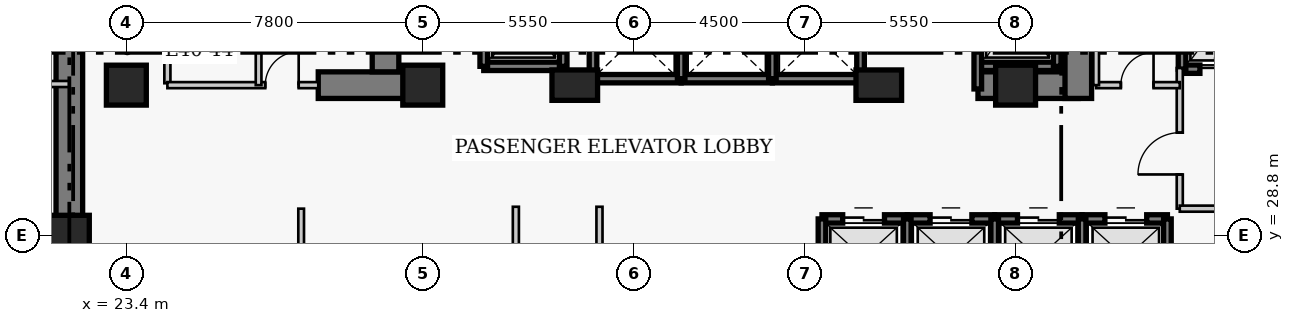
"""IFC4 building model, lengths in metres.
Left out: names, types, materials, properties, quantities, classifications, styles, units other than length and angle.
Written with IfcOpenShell. Run it as: python <this file> out.ifc"""

import sys

from ifc_helpers import new_model, si_unit, direction, frame, frame_2d, origin, origin_2d, place, context, subcontext, project, spatial, rectangle, extrude, element, fill, save


model = new_model("IFC4")
c1 = context("Model", 3, precision=1e-05, world=origin(), true_north=direction((0.0, 1.0)))
c2 = subcontext(c1, "Body", "Model", "MODEL_VIEW")
j1 = project(units=[si_unit("LENGTHUNIT", "METRE"), si_unit("PLANEANGLEUNIT", "RADIAN")], contexts=[c1])
p1 = place(None, origin())
s1 = spatial("IfcSite", under=j1, at=p1, CompositionType="ELEMENT")
p2 = place(p1, origin())
s2 = spatial("IfcBuilding", under=s1, at=p2, CompositionType="ELEMENT")
p3 = place(p2, frame((0.0, 0.0, 161.2)))
s3 = spatial("IfcBuildingStorey", under=s2, at=p3, CompositionType="ELEMENT", Elevation=161.2)
p4 = place(p3, frame((21.9, 27.05, 0.0), z_axis=(0.0, 0.0, 1.0), x_axis=(0.0, 1.0, 0.0)))
e1 = element("IfcWall", 1, at=p4, inside=s3, PredefinedType="SHEAR", context=c2, shape_type="SweptSolid", body=[
    extrude(rectangle(XDim=13.62, YDim=0.7, at=frame_2d((6.81, 0.0))), origin(), (0.0, 0.0, 1.0), 3.8),
])
p5 = place(p3, frame((28.45, 32.75, 0.0), z_axis=(0.0, 0.0, 1.0), x_axis=(1.0, 0.0, 0.0)))
e2 = element("IfcWall", 2, at=p5, inside=s3, PredefinedType="SHEAR", context=c2, shape_type="SweptSolid", body=[
    extrude(rectangle(XDim=2.4, YDim=0.7, at=frame_2d((1.2, 0.0))), origin(), (0.0, 0.0, 1.0), 3.8),
])
p6 = place(p3, frame((45.81, 32.75, 0.0), z_axis=(0.0, 0.0, 1.0), x_axis=(1.0, 0.0, 0.0)))
e3 = element("IfcWall", 3, at=p6, inside=s3, PredefinedType="SHEAR", context=c2, shape_type="SweptSolid", body=[
    extrude(rectangle(XDim=2.64, YDim=0.7, at=frame_2d((1.32, 0.0))), origin(), (0.0, 0.0, 1.0), 3.8),
])
p7 = place(p3, frame((30.22, 33.1, 0.0), z_axis=(0.0, 0.0, 1.0), x_axis=(0.0, 1.0, 0.0)))
e4 = element("IfcWall", 4, at=p7, inside=s3, PredefinedType="SHEAR", context=c2, shape_type="SweptSolid", body=[
    extrude(rectangle(XDim=7.22, YDim=0.7, at=frame_2d((3.61, 0.0))), origin(), (0.0, 0.0, 1.0), 3.8),
])
p8 = place(p3, frame((48.45, 32.4, 0.0), z_axis=(0.0, 0.0, 1.0), x_axis=(0.0, 1.0, 0.0)))
e5 = element("IfcWall", 5, at=p8, inside=s3, PredefinedType="SHEAR", context=c2, shape_type="SweptSolid", body=[
    extrude(rectangle(XDim=7.92, YDim=0.7, at=frame_2d((3.96, 0.0))), origin(), (0.0, 0.0, 1.0), 3.8),
])
p9 = place(p8, frame((5.8, 0.0, 0.0)))
e6 = element("IfcOpeningElement", 6, at=p9, cuts=e5, PredefinedType="OPENING", context=c2, shape_type="SweptSolid", body=[
    extrude(rectangle(XDim=1.1, YDim=2.15, at=frame_2d((0.55, 1.075))), frame((0.0, 0.36, 0.0), z_axis=(0.0, -1.0, 0.0), x_axis=(1.0, 0.0, 0.0)), (0.0, 0.0, 1.0), 0.72),
])
for number, where, z_axis, x_axis in (
    (7, (21.9, 28.8, 0.0), (0.0, 0.0, 1.0), (1.0, 0.0, 0.0)),
    (8, (23.4, 32.75, 0.0), (0.0, 0.0, 1.0), (1.0, 0.0, 0.0)),
    (9, (31.2, 32.75, 0.0), (0.0, 0.0, 1.0), (1.0, 0.0, 0.0)),
):
    element("IfcColumn", number, at=place(p3, frame(where, z_axis=z_axis, x_axis=x_axis)), inside=s3, PredefinedType="COLUMN", context=c2, shape_type="SweptSolid", body=[
        extrude(rectangle(XDim=1.05, YDim=1.05, at=origin_2d()), origin(), (0.0, 0.0, 1.0), 3.8),
    ])
for number, where, z_axis, x_axis in (
    (10, (35.2, 32.75, 0.0), (0.0, 0.0, 1.0), (1.0, 0.0, 0.0)),
    (11, (43.2, 32.75, 0.0), (0.0, 0.0, 1.0), (1.0, 0.0, 0.0)),
):
    element("IfcColumn", number, at=place(p3, frame(where, z_axis=z_axis, x_axis=x_axis)), inside=s3, PredefinedType="COLUMN", context=c2, shape_type="SweptSolid", body=[
        extrude(rectangle(XDim=1.2, YDim=0.8, at=origin_2d()), origin(), (0.0, 0.0, 1.0), 3.8),
    ])
p10 = place(p3, frame((46.8, 32.75, 0.0), z_axis=(0.0, 0.0, 1.0), x_axis=(1.0, 0.0, 0.0)))
e12 = element("IfcColumn", 12, at=p10, inside=s3, PredefinedType="COLUMN", context=c2, shape_type="SweptSolid", body=[
    extrude(rectangle(XDim=1.05, YDim=1.05, at=origin_2d()), origin(), (0.0, 0.0, 1.0), 3.8),
])
p11 = place(p3, frame((41.705, 29.23, 0.0), z_axis=(0.0, 0.0, 1.0), x_axis=(1.0, 0.0, 0.0)))
e13 = element("IfcWall", 13, at=p11, inside=s3, PredefinedType="SHEAR", context=c2, shape_type="SweptSolid", body=[
    extrude(rectangle(XDim=2.245, YDim=0.22, at=frame_2d((1.123, 0.0))), origin(), (0.0, 0.0, 1.0), 3.8),
])
p12 = place(p11, frame((0.545, 0.0, 0.0)))
e14 = element("IfcOpeningElement", 14, at=p12, cuts=e13, PredefinedType="OPENING", context=c2, shape_type="SweptSolid", body=[
    extrude(rectangle(XDim=1.1, YDim=2.15, at=frame_2d((0.55, 1.075))), frame((0.0, 0.12, 0.0), z_axis=(0.0, -1.0, 0.0), x_axis=(1.0, 0.0, 0.0)), (0.0, 0.0, 1.0), 0.24),
])
p13 = place(p3, frame((41.705, 27.17, 0.0), z_axis=(0.0, 0.0, 1.0), x_axis=(0.0, 1.0, 0.0)))
e15 = element("IfcWall", 15, at=p13, inside=s3, PredefinedType="SHEAR", context=c2, shape_type="SweptSolid", body=[
    extrude(rectangle(XDim=2.06, YDim=0.2, at=frame_2d((1.03, 0.0))), origin(), (0.0, 0.0, 1.0), 3.8),
])
p14 = place(p3, frame((43.95, 29.23, 0.0), z_axis=(0.0, 0.0, 1.0), x_axis=(1.0, 0.0, 0.0)))
e16 = element("IfcWall", 16, at=p14, inside=s3, PredefinedType="SHEAR", context=c2, shape_type="SweptSolid", body=[
    extrude(rectangle(XDim=2.3, YDim=0.22, at=frame_2d((1.15, 0.0))), origin(), (0.0, 0.0, 1.0), 3.8),
])
p15 = place(p14, frame((0.6, 0.0, 0.0)))
e17 = element("IfcOpeningElement", 17, at=p15, cuts=e16, PredefinedType="OPENING", context=c2, shape_type="SweptSolid", body=[
    extrude(rectangle(XDim=1.1, YDim=2.15, at=frame_2d((0.55, 1.075))), frame((0.0, 0.12, 0.0), z_axis=(0.0, -1.0, 0.0), x_axis=(1.0, 0.0, 0.0)), (0.0, 0.0, 1.0), 0.24),
])
p16 = place(p3, frame((43.95, 27.17, 0.0), z_axis=(0.0, 0.0, 1.0), x_axis=(0.0, 1.0, 0.0)))
e18 = element("IfcWall", 18, at=p16, inside=s3, PredefinedType="SHEAR", context=c2, shape_type="SweptSolid", body=[
    extrude(rectangle(XDim=2.06, YDim=0.2, at=frame_2d((1.03, 0.0))), origin(), (0.0, 0.0, 1.0), 3.8),
])
p17 = place(p3, frame((46.25, 29.23, 0.0), z_axis=(0.0, 0.0, 1.0), x_axis=(1.0, 0.0, 0.0)))
e19 = element("IfcWall", 19, at=p17, inside=s3, PredefinedType="SHEAR", context=c2, shape_type="SweptSolid", body=[
    extrude(rectangle(XDim=2.3, YDim=0.22, at=frame_2d((1.15, 0.0))), origin(), (0.0, 0.0, 1.0), 3.8),
])
p18 = place(p17, frame((0.6, 0.0, 0.0)))
e20 = element("IfcOpeningElement", 20, at=p18, cuts=e19, PredefinedType="OPENING", context=c2, shape_type="SweptSolid", body=[
    extrude(rectangle(XDim=1.1, YDim=2.15, at=frame_2d((0.55, 1.075))), frame((0.0, 0.12, 0.0), z_axis=(0.0, -1.0, 0.0), x_axis=(1.0, 0.0, 0.0)), (0.0, 0.0, 1.0), 0.24),
])
p19 = place(p3, frame((46.25, 27.17, 0.0), z_axis=(0.0, 0.0, 1.0), x_axis=(0.0, 1.0, 0.0)))
e21 = element("IfcWall", 21, at=p19, inside=s3, PredefinedType="SHEAR", context=c2, shape_type="SweptSolid", body=[
    extrude(rectangle(XDim=2.06, YDim=0.2, at=frame_2d((1.03, 0.0))), origin(), (0.0, 0.0, 1.0), 3.8),
])
p20 = place(p3, frame((48.55, 29.23, 0.0), z_axis=(0.0, 0.0, 1.0), x_axis=(1.0, 0.0, 0.0)))
e22 = element("IfcWall", 22, at=p20, inside=s3, PredefinedType="SHEAR", context=c2, shape_type="SweptSolid", body=[
    extrude(rectangle(XDim=2.245, YDim=0.22, at=frame_2d((1.123, 0.0))), origin(), (0.0, 0.0, 1.0), 3.8),
])
p21 = place(p20, frame((0.6, 0.0, 0.0)))
e23 = element("IfcOpeningElement", 23, at=p21, cuts=e22, PredefinedType="OPENING", context=c2, shape_type="SweptSolid", body=[
    extrude(rectangle(XDim=1.1, YDim=2.15, at=frame_2d((0.55, 1.075))), frame((0.0, 0.12, 0.0), z_axis=(0.0, -1.0, 0.0), x_axis=(1.0, 0.0, 0.0)), (0.0, 0.0, 1.0), 0.24),
])
for number, where, z_axis, x_axis in (
    (24, (48.55, 27.17, 0.0), (0.0, 0.0, 1.0), (0.0, 1.0, 0.0)),
    (25, (50.795, 27.17, 0.0), (0.0, 0.0, 1.0), (0.0, 1.0, 0.0)),
):
    element("IfcWall", number, at=place(p3, frame(where, z_axis=z_axis, x_axis=x_axis)), inside=s3, PredefinedType="SHEAR", context=c2, shape_type="SweptSolid", body=[
        extrude(rectangle(XDim=2.06, YDim=0.2, at=frame_2d((1.03, 0.0))), origin(), (0.0, 0.0, 1.0), 3.8),
    ])
p22 = place(p3, frame((35.68, 32.92, 0.0), z_axis=(0.0, 0.0, 1.0), x_axis=(1.0, 0.0, 0.0)))
e26 = element("IfcWall", 26, at=p22, inside=s3, PredefinedType="SHEAR", context=c2, shape_type="SweptSolid", body=[
    extrude(rectangle(XDim=2.32, YDim=0.22, at=frame_2d((1.16, 0.0))), origin(), (0.0, 0.0, 1.0), 3.8),
])
p23 = place(p3, frame((35.68, 32.92, 0.0), z_axis=(0.0, 0.0, 1.0), x_axis=(0.0, 1.0, 0.0)))
e27 = element("IfcWall", 27, at=p23, inside=s3, PredefinedType="SHEAR", context=c2, shape_type="SweptSolid", body=[
    extrude(rectangle(XDim=2.16, YDim=0.2, at=frame_2d((1.08, 0.0))), origin(), (0.0, 0.0, 1.0), 3.8),
])
p24 = place(p3, frame((38.0, 32.92, 0.0), z_axis=(0.0, 0.0, 1.0), x_axis=(1.0, 0.0, 0.0)))
e28 = element("IfcWall", 28, at=p24, inside=s3, PredefinedType="SHEAR", context=c2, shape_type="SweptSolid", body=[
    extrude(rectangle(XDim=2.4, YDim=0.22, at=frame_2d((1.2, 0.0))), origin(), (0.0, 0.0, 1.0), 3.8),
])
p25 = place(p3, frame((38.0, 32.92, 0.0), z_axis=(0.0, 0.0, 1.0), x_axis=(0.0, 1.0, 0.0)))
e29 = element("IfcWall", 29, at=p25, inside=s3, PredefinedType="SHEAR", context=c2, shape_type="SweptSolid", body=[
    extrude(rectangle(XDim=2.16, YDim=0.2, at=frame_2d((1.08, 0.0))), origin(), (0.0, 0.0, 1.0), 3.8),
])
p26 = place(p3, frame((40.4, 32.92, 0.0), z_axis=(0.0, 0.0, 1.0), x_axis=(1.0, 0.0, 0.0)))
e30 = element("IfcWall", 30, at=p26, inside=s3, PredefinedType="SHEAR", context=c2, shape_type="SweptSolid", body=[
    extrude(rectangle(XDim=2.32, YDim=0.22, at=frame_2d((1.16, 0.0))), origin(), (0.0, 0.0, 1.0), 3.8),
])
for number, where, z_axis, x_axis in (
    (31, (40.4, 32.92, 0.0), (0.0, 0.0, 1.0), (0.0, 1.0, 0.0)),
    (32, (42.72, 32.92, 0.0), (0.0, 0.0, 1.0), (0.0, 1.0, 0.0)),
):
    element("IfcWall", number, at=place(p3, frame(where, z_axis=z_axis, x_axis=x_axis)), inside=s3, PredefinedType="SHEAR", context=c2, shape_type="SweptSolid", body=[
        extrude(rectangle(XDim=2.16, YDim=0.2, at=frame_2d((1.08, 0.0))), origin(), (0.0, 0.0, 1.0), 3.8),
    ])
p27 = place(p3, frame((51.18, 33.17, 0.0), z_axis=(0.0, 0.0, 1.0), x_axis=(1.0, 0.0, 0.0)))
e33 = element("IfcWall", 33, at=p27, inside=s3, PredefinedType="SHEAR", context=c2, shape_type="SweptSolid", body=[
    extrude(rectangle(XDim=2.42, YDim=0.22, at=frame_2d((1.21, 0.0))), origin(), (0.0, 0.0, 1.0), 3.8),
])
p28 = place(p27, frame((0.47, 0.0, 0.0)))
e34 = element("IfcOpeningElement", 34, at=p28, cuts=e33, PredefinedType="OPENING", context=c2, shape_type="SweptSolid", body=[
    extrude(rectangle(XDim=1.3, YDim=2.15, at=frame_2d((0.65, 1.075))), frame((0.0, 0.12, 0.0), z_axis=(0.0, -1.0, 0.0), x_axis=(1.0, 0.0, 0.0)), (0.0, 0.0, 1.0), 0.24),
])
p29 = place(p3, frame((51.18, 33.17, 0.0), z_axis=(0.0, 0.0, 1.0), x_axis=(0.0, 1.0, 0.0)))
e35 = element("IfcWall", 35, at=p29, inside=s3, PredefinedType="SHEAR", context=c2, shape_type="SweptSolid", body=[
    extrude(rectangle(XDim=2.86, YDim=0.2, at=frame_2d((1.43, 0.0))), origin(), (0.0, 0.0, 1.0), 3.8),
])
p30 = place(p3, frame((32.805, 33.245, 0.0), z_axis=(0.0, 0.0, 1.0), x_axis=(1.0, 0.0, 0.0)))
e36 = element("IfcWall", 36, at=p30, inside=s3, PredefinedType="SHEAR", context=c2, shape_type="SweptSolid", body=[
    extrude(rectangle(XDim=2.09, YDim=0.22, at=frame_2d((1.045, 0.0))), origin(), (0.0, 0.0, 1.0), 3.8),
])
for number, where, z_axis, x_axis in (
    (37, (32.805, 33.245, 0.0), (0.0, 0.0, 1.0), (0.0, 1.0, 0.0)),
    (38, (34.895, 33.245, 0.0), (0.0, 0.0, 1.0), (0.0, 1.0, 0.0)),
):
    element("IfcWall", number, at=place(p3, frame(where, z_axis=z_axis, x_axis=x_axis)), inside=s3, PredefinedType="SHEAR", context=c2, shape_type="SweptSolid", body=[
        extrude(rectangle(XDim=2.91, YDim=0.2, at=frame_2d((1.455, 0.0))), origin(), (0.0, 0.0, 1.0), 3.8),
    ])
p31 = place(p3, frame((45.805, 33.245, 0.0), z_axis=(0.0, 0.0, 1.0), x_axis=(1.0, 0.0, 0.0)))
e39 = element("IfcWall", 39, at=p31, inside=s3, PredefinedType="SHEAR", context=c2, shape_type="SweptSolid", body=[
    extrude(rectangle(XDim=2.09, YDim=0.22, at=frame_2d((1.045, 0.0))), origin(), (0.0, 0.0, 1.0), 3.8),
])
p32 = place(p3, frame((45.805, 32.65, 0.0), z_axis=(0.0, 0.0, 1.0), x_axis=(0.0, 1.0, 0.0)))
e40 = element("IfcWall", 40, at=p32, inside=s3, PredefinedType="SHEAR", context=c2, shape_type="SweptSolid", body=[
    extrude(rectangle(XDim=3.505, YDim=0.2, at=frame_2d((1.752, 0.0))), origin(), (0.0, 0.0, 1.0), 3.8),
])
p33 = place(p3, frame((47.895, 33.245, 0.0), z_axis=(0.0, 0.0, 1.0), x_axis=(0.0, 1.0, 0.0)))
e41 = element("IfcWall", 41, at=p33, inside=s3, PredefinedType="SHEAR", context=c2, shape_type="SweptSolid", body=[
    extrude(rectangle(XDim=2.91, YDim=0.2, at=frame_2d((1.455, 0.0))), origin(), (0.0, 0.0, 1.0), 3.8),
])
p34 = place(p3, frame((24.48, 32.8, 0.0), z_axis=(0.0, 0.0, 1.0), x_axis=(0.0, 1.0, 0.0)))
e42 = element("IfcWall", 42, at=p34, inside=s3, PredefinedType="PARTITIONING", context=c2, shape_type="SweptSolid", body=[
    extrude(rectangle(XDim=3.57, YDim=0.16, at=frame_2d((1.785, 0.0))), origin(), (0.0, 0.0, 1.0), 3.55),
])
p35 = place(p34, frame((1.604, 0.0, 0.0)))
e43 = element("IfcOpeningElement", 43, at=p35, cuts=e42, PredefinedType="OPENING", context=c2, shape_type="SweptSolid", body=[
    extrude(rectangle(XDim=0.9, YDim=2.1, at=frame_2d((0.45, 1.05))), frame((0.0, 0.09, 0.0), z_axis=(0.0, -1.0, 0.0), x_axis=(1.0, 0.0, 0.0)), (0.0, 0.0, 1.0), 0.18),
])
p36 = place(p3, frame((51.12, 29.5, 0.0), z_axis=(0.0, 0.0, 1.0), x_axis=(0.0, 1.0, 0.0)))
e44 = element("IfcWall", 44, at=p36, inside=s3, PredefinedType="PARTITIONING", context=c2, shape_type="SweptSolid", body=[
    extrude(rectangle(XDim=3.7, YDim=0.16, at=frame_2d((1.85, 0.0))), origin(), (0.0, 0.0, 1.0), 3.55),
])
p37 = place(p36, frame((0.9, 0.0, 0.0)))
e45 = element("IfcOpeningElement", 45, at=p37, cuts=e44, PredefinedType="OPENING", context=c2, shape_type="SweptSolid", body=[
    extrude(rectangle(XDim=1.1, YDim=2.15, at=frame_2d((0.55, 1.075))), frame((0.0, 0.09, 0.0), z_axis=(0.0, -1.0, 0.0), x_axis=(1.0, 0.0, 0.0)), (0.0, 0.0, 1.0), 0.18),
])
p38 = place(p3, frame((51.12, 29.5, 0.0), z_axis=(0.0, 0.0, 1.0), x_axis=(1.0, 0.0, 0.0)))
e46 = element("IfcWall", 46, at=p38, inside=s3, PredefinedType="PARTITIONING", context=c2, shape_type="SweptSolid", body=[
    extrude(rectangle(XDim=5.63, YDim=0.16, at=frame_2d((2.815, 0.0))), origin(), (0.0, 0.0, 1.0), 3.55),
])
p39 = place(p3, frame((24.48, 32.75, 0.0), z_axis=(0.0, 0.0, 1.0), x_axis=(1.0, 0.0, 0.0)))
e47 = element("IfcWall", 47, at=p39, inside=s3, PredefinedType="PARTITIONING", context=c2, shape_type="SweptSolid", body=[
    extrude(rectangle(XDim=3.97, YDim=0.16, at=frame_2d((1.985, 0.0))), origin(), (0.0, 0.0, 1.0), 3.55),
])
p40 = place(p39, frame((2.575, 0.0, 0.0)))
e48 = element("IfcOpeningElement", 48, at=p40, cuts=e47, PredefinedType="OPENING", context=c2, shape_type="SweptSolid", body=[
    extrude(rectangle(XDim=0.88, YDim=2.05, at=frame_2d((0.44, 1.025))), frame((0.0, 0.09, 0.0), z_axis=(0.0, -1.0, 0.0), x_axis=(1.0, 0.0, 0.0)), (0.0, 0.0, 1.0), 0.18),
])
p41 = place(p3, frame((48.92, 32.75, 0.0), z_axis=(0.0, 0.0, 1.0), x_axis=(1.0, 0.0, 0.0)))
e49 = element("IfcWall", 49, at=p41, inside=s3, PredefinedType="PARTITIONING", context=c2, shape_type="SweptSolid", body=[
    extrude(rectangle(XDim=2.2, YDim=0.16, at=frame_2d((1.1, 0.0))), origin(), (0.0, 0.0, 1.0), 3.55),
])
p42 = place(p41, frame((0.65, 0.0, 0.0)))
e50 = element("IfcOpeningElement", 50, at=p42, cuts=e49, PredefinedType="OPENING", context=c2, shape_type="SweptSolid", body=[
    extrude(rectangle(XDim=0.86, YDim=2.05, at=frame_2d((0.43, 1.025))), frame((0.0, 0.09, 0.0), z_axis=(0.0, -1.0, 0.0), x_axis=(1.0, 0.0, 0.0)), (0.0, 0.0, 1.0), 0.18),
])
for number, where, z_axis, x_axis in (
    (51, (48.92, 32.75, 0.0), (0.0, 0.0, 1.0), (0.0, 1.0, 0.0)),
    (52, (26.88, 32.75, 0.0), (0.0, 0.0, 1.0), (0.0, 1.0, 0.0)),
):
    element("IfcWall", number, at=place(p3, frame(where, z_axis=z_axis, x_axis=x_axis)), inside=s3, PredefinedType="PARTITIONING", context=c2, shape_type="SweptSolid", body=[
        extrude(rectangle(XDim=3.62, YDim=0.15, at=frame_2d((1.81, 0.0))), origin(), (0.0, 0.0, 1.0), 3.55),
    ])
for number, where, z_axis, x_axis in (
    (53, (33.65, 16.51, 0.0), (0.0, 0.0, 1.0), (0.0, 1.0, 0.0)),
    (54, (35.85, 16.51, 0.0), (0.0, 0.0, 1.0), (0.0, 1.0, 0.0)),
):
    element("IfcWall", number, at=place(p3, frame(where, z_axis=z_axis, x_axis=x_axis)), inside=s3, PredefinedType="PARTITIONING", context=c2, shape_type="SweptSolid", body=[
        extrude(rectangle(XDim=13.04, YDim=0.16, at=frame_2d((6.52, 0.0))), origin(), (0.0, 0.0, 1.0), 3.55),
    ])
p43 = place(p3, frame((19.41, 32.78, 0.0), z_axis=(0.0, 0.0, 1.0), x_axis=(1.0, 0.0, 0.0)))
e55 = element("IfcWall", 55, at=p43, inside=s3, PredefinedType="PARTITIONING", context=c2, shape_type="SweptSolid", body=[
    extrude(rectangle(XDim=2.49, YDim=0.16, at=frame_2d((1.245, 0.0))), origin(), (0.0, 0.0, 1.0), 3.55),
])
p44 = place(p3, frame((28.0, 16.51, 0.0), z_axis=(0.0, 0.0, 1.0), x_axis=(0.0, 1.0, 0.0)))
e56 = element("IfcWall", 56, at=p44, inside=s3, PredefinedType="PARTITIONING", context=c2, shape_type="SweptSolid", body=[
    extrude(rectangle(XDim=12.99, YDim=0.15, at=frame_2d((6.495, 0.0))), origin(), (0.0, 0.0, 1.0), 3.55),
])
p45 = place(p12, origin())
e57 = element("IfcDoor", 57, at=p45, inside=s3, OperationType="DOUBLE_DOOR_SLIDING", PredefinedType="DOOR", context=c2, shape_type="SweptSolid", body=[
    extrude(rectangle(XDim=1.1, YDim=2.15, at=frame_2d((0.55, 1.075))), frame((0.0, 0.025, 0.0), z_axis=(0.0, -1.0, 0.0), x_axis=(1.0, 0.0, 0.0)), (0.0, 0.0, 1.0), 0.05),
])
fill(e14, e57)
p46 = place(p15, origin())
e58 = element("IfcDoor", 58, at=p46, inside=s3, OperationType="DOUBLE_DOOR_SLIDING", PredefinedType="DOOR", context=c2, shape_type="SweptSolid", body=[
    extrude(rectangle(XDim=1.1, YDim=2.15, at=frame_2d((0.55, 1.075))), frame((0.0, 0.025, 0.0), z_axis=(0.0, -1.0, 0.0), x_axis=(1.0, 0.0, 0.0)), (0.0, 0.0, 1.0), 0.05),
])
fill(e17, e58)
p47 = place(p18, origin())
e59 = element("IfcDoor", 59, at=p47, inside=s3, OperationType="DOUBLE_DOOR_SLIDING", PredefinedType="DOOR", context=c2, shape_type="SweptSolid", body=[
    extrude(rectangle(XDim=1.1, YDim=2.15, at=frame_2d((0.55, 1.075))), frame((0.0, 0.025, 0.0), z_axis=(0.0, -1.0, 0.0), x_axis=(1.0, 0.0, 0.0)), (0.0, 0.0, 1.0), 0.05),
])
fill(e20, e59)
p48 = place(p21, origin())
e60 = element("IfcDoor", 60, at=p48, inside=s3, OperationType="DOUBLE_DOOR_SLIDING", PredefinedType="DOOR", context=c2, shape_type="SweptSolid", body=[
    extrude(rectangle(XDim=1.1, YDim=2.15, at=frame_2d((0.55, 1.075))), frame((0.0, 0.025, 0.0), z_axis=(0.0, -1.0, 0.0), x_axis=(1.0, 0.0, 0.0)), (0.0, 0.0, 1.0), 0.05),
])
fill(e23, e60)
p49 = place(p28, origin())
e61 = element("IfcDoor", 61, at=p49, inside=s3, OperationType="DOUBLE_DOOR_SLIDING", PredefinedType="DOOR", context=c2, shape_type="SweptSolid", body=[
    extrude(rectangle(XDim=1.3, YDim=2.15, at=frame_2d((0.65, 1.075))), frame((0.0, 0.025, 0.0), z_axis=(0.0, -1.0, 0.0), x_axis=(1.0, 0.0, 0.0)), (0.0, 0.0, 1.0), 0.05),
])
fill(e34, e61)
p50 = place(p37, origin())
e62 = element("IfcDoor", 62, at=p50, inside=s3, OperationType="SINGLE_SWING_LEFT", PredefinedType="DOOR", context=c2, shape_type="SweptSolid", body=[
    extrude(rectangle(XDim=1.1, YDim=2.15, at=frame_2d((0.55, 1.075))), frame((0.0, 0.025, 0.0), z_axis=(0.0, -1.0, 0.0), x_axis=(1.0, 0.0, 0.0)), (0.0, 0.0, 1.0), 0.05),
])
fill(e45, e62)
p51 = place(p40, origin())
e63 = element("IfcDoor", 63, at=p51, inside=s3, OperationType="SINGLE_SWING_RIGHT", PredefinedType="DOOR", context=c2, shape_type="SweptSolid", body=[
    extrude(rectangle(XDim=0.88, YDim=2.05, at=frame_2d((0.44, 1.025))), frame((0.0, 0.025, 0.0), z_axis=(0.0, -1.0, 0.0), x_axis=(1.0, 0.0, 0.0)), (0.0, 0.0, 1.0), 0.05),
])
fill(e48, e63)
p52 = place(p42, origin())
e64 = element("IfcDoor", 64, at=p52, inside=s3, OperationType="SINGLE_SWING_RIGHT", PredefinedType="DOOR", context=c2, shape_type="SweptSolid", body=[
    extrude(rectangle(XDim=0.86, YDim=2.05, at=frame_2d((0.43, 1.025))), frame((0.0, 0.025, 0.0), z_axis=(0.0, -1.0, 0.0), x_axis=(1.0, 0.0, 0.0)), (0.0, 0.0, 1.0), 0.05),
])
fill(e50, e64)
save(model, sys.argv[1])
